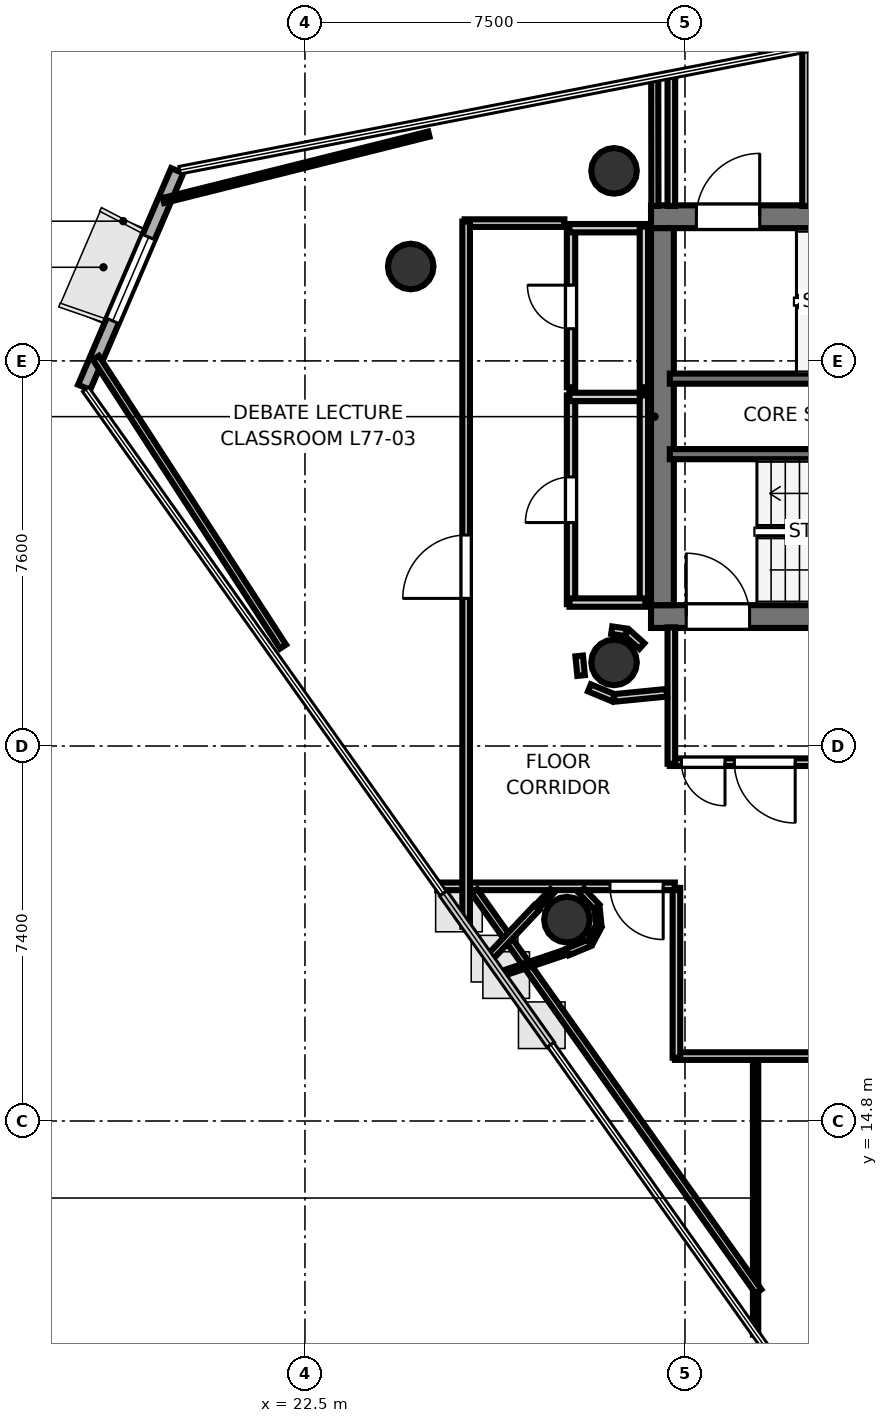
"""IFC4 building model, lengths in metres.
Left out: names, types, materials, properties, quantities, classifications, styles, units other than length and angle.
Written with IfcOpenShell. Run it as: python <this file> out.ifc"""

import sys

from ifc_helpers import new_model, si_unit, direction, frame, frame_2d, origin, origin_2d, place, context, subcontext, project, spatial, rectangle, hollow_circle, extrude, element, fill, save


model = new_model("IFC4")
c1 = context("Model", 3, precision=1e-05, world=origin(), true_north=direction((0.0, 1.0)))
c2 = subcontext(c1, "Body", "Model", "MODEL_VIEW")
j1 = project(units=[si_unit("LENGTHUNIT", "METRE"), si_unit("PLANEANGLEUNIT", "RADIAN")], contexts=[c1])
p1 = place(None, origin())
s1 = spatial("IfcSite", under=j1, at=p1, CompositionType="ELEMENT")
p2 = place(p1, origin())
s2 = spatial("IfcBuilding", under=s1, at=p2, CompositionType="ELEMENT")
p3 = place(p2, frame((0.0, 0.0, 299.1)))
s3 = spatial("IfcBuildingStorey", under=s2, at=p3, CompositionType="ELEMENT", Elevation=299.1)
p4 = place(p3, frame((29.33, 32.645, 0.0), z_axis=(0.0, 0.0, 1.0), x_axis=(1.0, 0.0, 0.0)))
e1 = element("IfcWall", 1, at=p4, inside=s3, PredefinedType="SHEAR", context=c2, shape_type="SweptSolid", body=[
    extrude(rectangle(XDim=10.52, YDim=0.45, at=frame_2d((5.26, 0.0))), origin(), (0.0, 0.0, 1.0), 3.52),
])
p5 = place(p4, frame((0.895, 0.0, 0.0)))
e2 = element("IfcOpeningElement", 2, at=p5, cuts=e1, PredefinedType="OPENING", context=c2, shape_type="SweptSolid", body=[
    extrude(rectangle(XDim=1.25, YDim=2.15, at=frame_2d((0.625, 1.075))), frame((0.0, 0.235, 0.0), z_axis=(0.0, -1.0, 0.0), x_axis=(1.0, 0.0, 0.0)), (0.0, 0.0, 1.0), 0.47),
])
p6 = place(p3, frame((29.33, 24.755, 0.0), z_axis=(0.0, 0.0, 1.0), x_axis=(1.0, 0.0, 0.0)))
e3 = element("IfcWall", 3, at=p6, inside=s3, PredefinedType="SHEAR", context=c2, shape_type="SweptSolid", body=[
    extrude(rectangle(XDim=10.52, YDim=0.45, at=frame_2d((5.26, 0.0))), origin(), (0.0, 0.0, 1.0), 3.52),
])
p7 = place(p6, frame((0.695, 0.0, 0.0)))
e4 = element("IfcOpeningElement", 4, at=p7, cuts=e3, PredefinedType="OPENING", context=c2, shape_type="SweptSolid", body=[
    extrude(rectangle(XDim=1.25, YDim=2.15, at=frame_2d((0.625, 1.075))), frame((0.0, 0.235, 0.0), z_axis=(0.0, -1.0, 0.0), x_axis=(1.0, 0.0, 0.0)), (0.0, 0.0, 1.0), 0.47),
])
p8 = place(p3, frame((29.555, 24.98, 0.0), z_axis=(0.0, 0.0, 1.0), x_axis=(0.0, 1.0, 0.0)))
e5 = element("IfcWall", 5, at=p8, inside=s3, PredefinedType="SHEAR", context=c2, shape_type="SweptSolid", body=[
    extrude(rectangle(XDim=7.44, YDim=0.45, at=frame_2d((3.72, 0.0))), origin(), (0.0, 0.0, 1.0), 3.52),
])
for number, where, z_axis, x_axis in (
    (6, (28.6, 33.55, 0.0), (0.0, 0.0, 1.0), (1.0, 0.0, 0.0)),
    (7, (28.6, 23.85, 0.0), (0.0, 0.0, 1.0), (1.0, 0.0, 0.0)),
    (8, (24.587, 31.663, 0.0), (0.0, 0.0, 1.0), (1.0, 0.0, 0.0)),
    (9, (27.67, 18.774, 0.0), (0.0, 0.0, 1.0), (1.0, 0.0, 0.0)),
):
    element("IfcColumn", number, at=place(p3, frame(where, z_axis=z_axis, x_axis=x_axis)), inside=s3, PredefinedType="COLUMN", context=c2, shape_type="SweptSolid", body=[
        extrude(hollow_circle(Radius=0.45, WallThickness=0.025, at=origin_2d()), origin(), (0.0, 0.0, 1.0), 3.7),
    ])
p9 = place(p3, frame((19.979, 33.554, 0.0), z_axis=(0.0, 0.0, 1.0), x_axis=(-0.394793036807, -0.918770079013, 0.0)))
e10 = element("IfcWall", 10, at=p9, inside=s3, PredefinedType="SOLIDWALL", context=c2, shape_type="SweptSolid", body=[
    extrude(rectangle(XDim=4.653, YDim=0.26, at=frame_2d((2.326, 0.0))), origin(), (0.0, 0.0, 1.0), 3.52),
])
p10 = place(p9, frame((1.426, 0.0, 0.85)))
e11 = element("IfcOpeningElement", 11, at=p10, cuts=e10, PredefinedType="OPENING", context=c2, shape_type="SweptSolid", body=[
    extrude(rectangle(XDim=1.8, YDim=2.1, at=frame_2d((0.9, 1.05))), frame((0.0, 0.14, 0.0), z_axis=(0.0, -1.0, 0.0), x_axis=(1.0, 0.0, 0.0)), (0.0, 0.0, 1.0), 0.28),
])
p11 = place(p3, frame((29.7, 29.45, 0.0), z_axis=(0.0, 0.0, 1.0), x_axis=(1.0, 0.0, 0.0)))
e12 = element("IfcWall", 12, at=p11, inside=s3, PredefinedType="SOLIDWALL", context=c2, shape_type="SweptSolid", body=[
    extrude(rectangle(XDim=8.3, YDim=0.2, at=frame_2d((4.15, 0.0))), origin(), (0.0, 0.0, 1.0), 3.52),
])
p12 = place(p3, frame((29.7, 27.96, 0.0), z_axis=(0.0, 0.0, 1.0), x_axis=(1.0, 0.0, 0.0)))
e13 = element("IfcWall", 13, at=p12, inside=s3, PredefinedType="SOLIDWALL", context=c2, shape_type="SweptSolid", body=[
    extrude(rectangle(XDim=7.75, YDim=0.2, at=frame_2d((3.875, 0.0))), origin(), (0.0, 0.0, 1.0), 3.52),
])
p13 = place(p3, frame((29.731, 32.858, 0.0), z_axis=(0.0, 0.0, 1.0), x_axis=(0.0, 1.0, 0.0)))
e14 = element("IfcWall", 14, at=p13, inside=s3, PredefinedType="PARTITIONING", context=c2, shape_type="SweptSolid", body=[
    extrude(rectangle(XDim=2.613, YDim=0.15, at=frame_2d((1.307, 0.0))), origin(), (0.0, 0.0, 1.0), 2.84),
])
p14 = place(p3, frame((32.389, 35.988, 0.0), z_axis=(0.0, 0.0, 1.0), x_axis=(0.0, -1.0, 0.0)))
e15 = element("IfcWall", 15, at=p14, inside=s3, PredefinedType="PARTITIONING", context=c2, shape_type="SweptSolid", body=[
    extrude(rectangle(XDim=3.13, YDim=0.15, at=frame_2d((1.565, 0.0))), origin(), (0.0, 0.0, 1.0), 2.84),
])
p15 = place(p3, frame((33.45, 21.881, 0.0), z_axis=(0.0, 0.0, 1.0), x_axis=(-1.0, 0.0, 0.0)))
e16 = element("IfcWall", 16, at=p15, inside=s3, PredefinedType="PARTITIONING", context=c2, shape_type="SweptSolid", body=[
    extrude(rectangle(XDim=3.75, YDim=0.15, at=frame_2d((1.875, 0.0))), origin(), (0.0, 0.0, 1.0), 2.84),
])
p16 = place(p15, frame((1.275, 0.0, 0.0)))
e17 = element("IfcOpeningElement", 17, at=p16, cuts=e16, PredefinedType="OPENING", context=c2, shape_type="SweptSolid", body=[
    extrude(rectangle(XDim=1.2, YDim=2.15, at=frame_2d((0.6, 1.075))), frame((0.0, 0.085, 0.0), z_axis=(0.0, -1.0, 0.0), x_axis=(1.0, 0.0, 0.0)), (0.0, 0.0, 1.0), 0.17),
])
p17 = place(p15, frame((2.66, 0.0, 0.0)))
e18 = element("IfcOpeningElement", 18, at=p17, cuts=e16, PredefinedType="OPENING", context=c2, shape_type="SweptSolid", body=[
    extrude(rectangle(XDim=0.86, YDim=2.05, at=frame_2d((0.43, 1.025))), frame((0.0, 0.085, 0.0), z_axis=(0.0, -1.0, 0.0), x_axis=(1.0, 0.0, 0.0)), (0.0, 0.0, 1.0), 0.17),
])
p18 = place(p3, frame((29.731, 21.85, 0.0), z_axis=(0.0, 0.0, 1.0), x_axis=(0.0, 1.0, 0.0)))
e19 = element("IfcWall", 19, at=p18, inside=s3, PredefinedType="PARTITIONING", context=c2, shape_type="SweptSolid", body=[
    extrude(rectangle(XDim=2.692, YDim=0.15, at=frame_2d((1.346, 0.0))), origin(), (0.0, 0.0, 1.0), 2.84),
])
p19 = place(p3, frame((27.751, 25.0, 0.0), z_axis=(0.0, 0.0, 1.0), x_axis=(0.0, 1.0, 0.0)))
e20 = element("IfcWall", 20, at=p19, inside=s3, PredefinedType="PLUMBINGWALL", context=c2, shape_type="SweptSolid", body=[
    extrude(rectangle(XDim=4.12, YDim=0.165, at=frame_2d((2.06, 0.0))), origin(), (0.0, 0.0, 1.0), 2.84),
])
p20 = place(p19, frame((1.61, 0.0, 0.0)))
e21 = element("IfcOpeningElement", 21, at=p20, cuts=e20, PredefinedType="OPENING", context=c2, shape_type="SweptSolid", body=[
    extrude(rectangle(XDim=0.9, YDim=2.1, at=frame_2d((0.45, 1.05))), frame((0.0, 0.093, 0.0), z_axis=(0.0, -1.0, 0.0), x_axis=(1.0, 0.0, 0.0)), (0.0, 0.0, 1.0), 0.185),
])
p21 = place(p3, frame((27.72, 29.089, 0.0), z_axis=(0.0, 0.0, 1.0), x_axis=(1.0, 0.0, 0.0)))
e22 = element("IfcWall", 22, at=p21, inside=s3, PredefinedType="PLUMBINGWALL", context=c2, shape_type="SweptSolid", body=[
    extrude(rectangle(XDim=1.5, YDim=0.165, at=frame_2d((0.75, 0.0))), origin(), (0.0, 0.0, 1.0), 2.84),
])
p22 = place(p3, frame((29.189, 29.12, 0.0), z_axis=(0.0, 0.0, 1.0), x_axis=(0.0, -1.0, 0.0)))
e23 = element("IfcWall", 23, at=p22, inside=s3, PredefinedType="PLUMBINGWALL", context=c2, shape_type="SweptSolid", body=[
    extrude(rectangle(XDim=4.12, YDim=0.165, at=frame_2d((2.06, 0.0))), origin(), (0.0, 0.0, 1.0), 2.84),
])
p23 = place(p3, frame((29.22, 25.031, 0.0), z_axis=(0.0, 0.0, 1.0), x_axis=(-1.0, 0.0, 0.0)))
e24 = element("IfcWall", 24, at=p23, inside=s3, PredefinedType="PLUMBINGWALL", context=c2, shape_type="SweptSolid", body=[
    extrude(rectangle(XDim=1.5, YDim=0.165, at=frame_2d((0.75, 0.0))), origin(), (0.0, 0.0, 1.0), 2.84),
])
p24 = place(p3, frame((27.751, 29.28, 0.0), z_axis=(0.0, 0.0, 1.0), x_axis=(0.0, 1.0, 0.0)))
e25 = element("IfcWall", 25, at=p24, inside=s3, PredefinedType="PLUMBINGWALL", context=c2, shape_type="SweptSolid", body=[
    extrude(rectangle(XDim=3.17, YDim=0.165, at=frame_2d((1.585, 0.0))), origin(), (0.0, 0.0, 1.0), 2.84),
])
p25 = place(p24, frame((1.155, 0.0, 0.0)))
e26 = element("IfcOpeningElement", 26, at=p25, cuts=e25, PredefinedType="OPENING", context=c2, shape_type="SweptSolid", body=[
    extrude(rectangle(XDim=0.86, YDim=2.05, at=frame_2d((0.43, 1.025))), frame((0.0, 0.093, 0.0), z_axis=(0.0, -1.0, 0.0), x_axis=(1.0, 0.0, 0.0)), (0.0, 0.0, 1.0), 0.185),
])
p26 = place(p3, frame((27.72, 32.419, 0.0), z_axis=(0.0, 0.0, 1.0), x_axis=(1.0, 0.0, 0.0)))
e27 = element("IfcWall", 27, at=p26, inside=s3, PredefinedType="PLUMBINGWALL", context=c2, shape_type="SweptSolid", body=[
    extrude(rectangle(XDim=1.5, YDim=0.165, at=frame_2d((0.75, 0.0))), origin(), (0.0, 0.0, 1.0), 2.84),
])
p27 = place(p3, frame((29.189, 32.45, 0.0), z_axis=(0.0, 0.0, 1.0), x_axis=(0.0, -1.0, 0.0)))
e28 = element("IfcWall", 28, at=p27, inside=s3, PredefinedType="PLUMBINGWALL", context=c2, shape_type="SweptSolid", body=[
    extrude(rectangle(XDim=3.17, YDim=0.165, at=frame_2d((1.585, 0.0))), origin(), (0.0, 0.0, 1.0), 2.84),
])
p28 = place(p3, frame((29.149, 24.173, 0.0), z_axis=(0.0, 0.0, 1.0), x_axis=(-0.745225165416, 0.666812906917, 0.0)))
e29 = element("IfcWall", 29, at=p28, inside=s3, PredefinedType="PARTITIONING", context=c2, shape_type="SweptSolid", body=[
    extrude(rectangle(XDim=0.396, YDim=0.15, at=frame_2d((0.198, 0.0))), origin(), (0.0, 0.0, 1.0), 2.84),
])
p29 = place(p3, frame((28.838, 24.444, 0.0), z_axis=(0.0, 0.0, 1.0), x_axis=(-0.989449148305, 0.144880581578, 0.0)))
e30 = element("IfcWall", 30, at=p29, inside=s3, PredefinedType="PARTITIONING", context=c2, shape_type="SweptSolid", body=[
    extrude(rectangle(XDim=0.286, YDim=0.15, at=frame_2d((0.143, 0.0))), origin(), (0.0, 0.0, 1.0), 2.84),
])
p30 = place(p3, frame((25.65, 32.519, 0.0), z_axis=(0.0, 0.0, 1.0), x_axis=(1.0, 0.0, 0.0)))
e31 = element("IfcWall", 31, at=p30, inside=s3, PredefinedType="PARTITIONING", context=c2, shape_type="SweptSolid", body=[
    extrude(rectangle(XDim=1.97, YDim=0.15, at=frame_2d((0.985, 0.0))), origin(), (0.0, 0.0, 1.0), 2.84),
])
p31 = place(p3, frame((27.912, 23.978, 0.0), z_axis=(0.0, 0.0, 1.0), x_axis=(0.097888269922, -0.995197410875, 0.0)))
e32 = element("IfcWall", 32, at=p31, inside=s3, PredefinedType="PARTITIONING", context=c2, shape_type="SweptSolid", body=[
    extrude(rectangle(XDim=0.389, YDim=0.15, at=frame_2d((0.195, 0.0))), origin(), (0.0, 0.0, 1.0), 2.84),
])
p32 = place(p3, frame((28.115, 23.348, 0.0), z_axis=(0.0, 0.0, 1.0), x_axis=(0.923807847969, -0.382856448334, 0.0)))
e33 = element("IfcWall", 33, at=p32, inside=s3, PredefinedType="PARTITIONING", context=c2, shape_type="SweptSolid", body=[
    extrude(rectangle(XDim=0.513, YDim=0.15, at=frame_2d((0.256, 0.0))), origin(), (0.0, 0.0, 1.0), 2.84),
])
p33 = place(p3, frame((28.603, 23.149, 0.0), z_axis=(0.0, 0.0, 1.0), x_axis=(0.995179827095, 0.098066873836, 0.0)))
e34 = element("IfcWall", 34, at=p33, inside=s3, PredefinedType="PARTITIONING", context=c2, shape_type="SweptSolid", body=[
    extrude(rectangle(XDim=1.043, YDim=0.15, at=frame_2d((0.521, 0.0))), origin(), (0.0, 0.0, 1.0), 2.84),
])
p34 = place(p3, frame((42.65, 16.081, 0.0), z_axis=(0.0, 0.0, 1.0), x_axis=(-1.0, 0.0, 0.0)))
e35 = element("IfcWall", 35, at=p34, inside=s3, PredefinedType="PARTITIONING", context=c2, shape_type="SweptSolid", body=[
    extrude(rectangle(XDim=12.85, YDim=0.15, at=frame_2d((6.425, 0.0))), origin(), (0.0, 0.0, 1.0), 2.84),
])
p35 = place(p34, frame((7.357, 0.0, 0.0)))
e36 = element("IfcOpeningElement", 36, at=p35, cuts=e35, PredefinedType="OPENING", context=c2, shape_type="SweptSolid", body=[
    extrude(rectangle(XDim=0.98, YDim=2.1, at=frame_2d((0.49, 1.05))), frame((0.0, 0.085, 0.0), z_axis=(0.0, -1.0, 0.0), x_axis=(1.0, 0.0, 0.0)), (0.0, 0.0, 1.0), 0.17),
])
p36 = place(p3, frame((29.831, 16.05, 0.0), z_axis=(0.0, 0.0, 1.0), x_axis=(0.0, 1.0, 0.0)))
e37 = element("IfcWall", 37, at=p36, inside=s3, PredefinedType="PARTITIONING", context=c2, shape_type="SweptSolid", body=[
    extrude(rectangle(XDim=3.35, YDim=0.15, at=frame_2d((1.675, 0.0))), origin(), (0.0, 0.0, 1.0), 2.84),
])
p37 = place(p3, frame((29.8, 19.431, 0.0), z_axis=(0.0, 0.0, 1.0), x_axis=(-1.0, 0.0, 0.0)))
e38 = element("IfcWall", 38, at=p37, inside=s3, PredefinedType="PARTITIONING", context=c2, shape_type="SweptSolid", body=[
    extrude(rectangle(XDim=4.689, YDim=0.15, at=frame_2d((2.345, 0.0))), origin(), (0.0, 0.0, 1.0), 2.84),
])
p38 = place(p37, frame((0.23, 0.0, 0.0)))
e39 = element("IfcOpeningElement", 39, at=p38, cuts=e38, PredefinedType="OPENING", context=c2, shape_type="SweptSolid", body=[
    extrude(rectangle(XDim=1.05, YDim=2.15, at=frame_2d((0.525, 1.075))), frame((0.0, 0.085, 0.0), z_axis=(0.0, -1.0, 0.0), x_axis=(1.0, 0.0, 0.0)), (0.0, 0.0, 1.0), 0.17),
])
p39 = place(p3, frame((25.681, 18.635, 0.0), z_axis=(0.0, 0.0, 1.0), x_axis=(0.0, 1.0, 0.0)))
e40 = element("IfcWall", 40, at=p39, inside=s3, PredefinedType="PARTITIONING", context=c2, shape_type="SweptSolid", body=[
    extrude(rectangle(XDim=13.915, YDim=0.15, at=frame_2d((6.958, 0.0))), origin(), (0.0, 0.0, 1.0), 2.84),
])
p40 = place(p39, frame((6.478, 0.0, 0.0)))
e41 = element("IfcOpeningElement", 41, at=p40, cuts=e40, PredefinedType="OPENING", context=c2, shape_type="SweptSolid", body=[
    extrude(rectangle(XDim=1.25, YDim=2.2, at=frame_2d((0.625, 1.1))), frame((0.0, 0.085, 0.0), z_axis=(0.0, -1.0, 0.0), x_axis=(1.0, 0.0, 0.0)), (0.0, 0.0, 1.0), 0.17),
])
p41 = place(p3, frame((31.394, 15.975, 0.0), z_axis=(0.0, 0.0, 1.0), x_axis=(0.0, -1.0, 0.0)))
e42 = element("IfcWall", 42, at=p41, inside=s3, PredefinedType="PARTITIONING", context=c2, shape_type="SweptSolid", body=[
    extrude(rectangle(XDim=5.39, YDim=0.105, at=frame_2d((2.695, 0.0))), origin(), (0.0, 0.0, 1.0), 2.84),
])
p42 = place(p3, frame((31.45, 11.435, 0.0), z_axis=(0.0, 0.0, 1.0), x_axis=(-0.578718901732, 0.815527088929, 0.0)))
e43 = element("IfcWall", 43, at=p42, inside=s3, PredefinedType="PARTITIONING", context=c2, shape_type="SweptSolid", body=[
    extrude(rectangle(XDim=9.691, YDim=0.14, at=frame_2d((4.846, 0.0))), origin(), (0.0, 0.0, 1.0), 2.84),
])
p43 = place(p3, frame((27.381, 19.341, 0.0), z_axis=(0.0, 0.0, 1.0), x_axis=(-0.689047004353, -0.724716652073, 0.0)))
e44 = element("IfcWall", 44, at=p43, inside=s3, PredefinedType="PARTITIONING", context=c2, shape_type="SweptSolid", body=[
    extrude(rectangle(XDim=0.431, YDim=0.105, at=frame_2d((0.216, 0.0))), origin(), (0.0, 0.0, 1.0), 2.84),
])
p44 = place(p3, frame((27.076, 19.01, 0.0), z_axis=(0.0, 0.0, 1.0), x_axis=(-0.686853877434, -0.726795535934, 0.0)))
e45 = element("IfcWall", 45, at=p44, inside=s3, PredefinedType="PARTITIONING", context=c2, shape_type="SweptSolid", body=[
    extrude(rectangle(XDim=1.369, YDim=0.14, at=frame_2d((0.685, 0.0))), origin(), (0.0, 0.0, 1.0), 2.84),
])
p45 = place(p3, frame((26.36, 17.699, 0.0), z_axis=(0.0, 0.0, 1.0), x_axis=(0.947806372533, 0.318846483727, 0.0)))
e46 = element("IfcWall", 46, at=p45, inside=s3, PredefinedType="PARTITIONING", context=c2, shape_type="SweptSolid", body=[
    extrude(rectangle(XDim=1.37, YDim=0.105, at=frame_2d((0.685, 0.0))), origin(), (0.0, 0.0, 1.0), 2.84),
])
p46 = place(p3, frame((27.682, 18.135, 0.0), z_axis=(0.0, 0.0, 1.0), x_axis=(0.924048683901, 0.382274809242, 0.0)))
e47 = element("IfcWall", 47, at=p46, inside=s3, PredefinedType="PARTITIONING", context=c2, shape_type="SweptSolid", body=[
    extrude(rectangle(XDim=0.467, YDim=0.14, at=frame_2d((0.233, 0.0))), origin(), (0.0, 0.0, 1.0), 2.84),
])
p47 = place(p3, frame((28.129, 18.328, 0.0), z_axis=(0.0, 0.0, 1.0), x_axis=(0.471589913721, 0.881817981942, 0.0)))
e48 = element("IfcWall", 48, at=p47, inside=s3, PredefinedType="PARTITIONING", context=c2, shape_type="SweptSolid", body=[
    extrude(rectangle(XDim=0.354, YDim=0.12, at=frame_2d((0.177, 0.0))), origin(), (0.0, 0.0, 1.0), 2.84),
])
p48 = place(p3, frame((28.299, 18.658, 0.0), z_axis=(0.0, 0.0, 1.0), x_axis=(-0.097865889817, 0.995199611942, 0.0)))
e49 = element("IfcWall", 49, at=p48, inside=s3, PredefinedType="PARTITIONING", context=c2, shape_type="SweptSolid", body=[
    extrude(rectangle(XDim=0.354, YDim=0.105, at=frame_2d((0.177, 0.0))), origin(), (0.0, 0.0, 1.0), 2.84),
])
p49 = place(p3, frame((28.256, 19.029, 0.0), z_axis=(0.0, 0.0, 1.0), x_axis=(-0.689344198757, 0.724433969137, 0.0)))
e50 = element("IfcWall", 50, at=p49, inside=s3, PredefinedType="PARTITIONING", context=c2, shape_type="SweptSolid", body=[
    extrude(rectangle(XDim=0.431, YDim=0.14, at=frame_2d((0.216, 0.0))), origin(), (0.0, 0.0, 1.0), 2.84),
])
p50 = place(p3, frame((19.708, 32.966, 0.0), z_axis=(0.0, 0.0, 1.0), x_axis=(0.970113232827, 0.242652664306, 0.0)))
e51 = element("IfcWall", 51, at=p50, inside=s3, PredefinedType="PARTITIONING", context=c2, shape_type="SweptSolid", body=[
    extrude(rectangle(XDim=5.399, YDim=0.105, at=frame_2d((2.699, 0.0))), origin(), (0.0, 0.0, 1.0), 2.84),
])
p51 = place(p3, frame((29.403, 35.407, 0.0), z_axis=(0.0, 0.0, 1.0), x_axis=(0.001532418467, -0.999998825846, 0.0)))
e52 = element("IfcWall", 52, at=p51, inside=s3, PredefinedType="PARTITIONING", context=c2, shape_type="SweptSolid", body=[
    extrude(rectangle(XDim=2.549, YDim=0.14, at=frame_2d((1.274, 0.0))), origin(), (0.0, 0.0, 1.0), 2.84),
])
p52 = place(p3, frame((22.068, 24.162, 0.0), z_axis=(0.0, 0.0, 1.0), x_axis=(-0.543845770902, 0.839185186638, 0.0)))
e53 = element("IfcWall", 53, at=p52, inside=s3, PredefinedType="PARTITIONING", context=c2, shape_type="SweptSolid", body=[
    extrude(rectangle(XDim=6.792, YDim=0.14, at=frame_2d((3.396, 0.0))), origin(), (0.0, 0.0, 1.0), 2.84),
])
p53 = place(p5, origin())
e54 = element("IfcDoor", 54, at=p53, inside=s3, OperationType="SINGLE_SWING_RIGHT", PredefinedType="DOOR", context=c2, shape_type="SweptSolid", body=[
    extrude(rectangle(XDim=1.25, YDim=2.15, at=frame_2d((0.625, 1.075))), frame((0.0, 0.025, 0.0), z_axis=(0.0, -1.0, 0.0), x_axis=(1.0, 0.0, 0.0)), (0.0, 0.0, 1.0), 0.05),
])
fill(e2, e54)
p54 = place(p7, origin())
e55 = element("IfcDoor", 55, at=p54, inside=s3, OperationType="SINGLE_SWING_LEFT", PredefinedType="DOOR", context=c2, shape_type="SweptSolid", body=[
    extrude(rectangle(XDim=1.25, YDim=2.15, at=frame_2d((0.625, 1.075))), frame((0.0, 0.025, 0.0), z_axis=(0.0, -1.0, 0.0), x_axis=(1.0, 0.0, 0.0)), (0.0, 0.0, 1.0), 0.05),
])
fill(e4, e55)
p55 = place(p16, origin())
e56 = element("IfcDoor", 56, at=p55, inside=s3, OperationType="SINGLE_SWING_LEFT", PredefinedType="DOOR", context=c2, shape_type="SweptSolid", body=[
    extrude(rectangle(XDim=1.2, YDim=2.15, at=frame_2d((0.6, 1.075))), frame((0.0, 0.025, 0.0), z_axis=(0.0, -1.0, 0.0), x_axis=(1.0, 0.0, 0.0)), (0.0, 0.0, 1.0), 0.05),
])
fill(e17, e56)
p56 = place(p20, origin())
e57 = element("IfcDoor", 57, at=p56, inside=s3, OperationType="SINGLE_SWING_LEFT", PredefinedType="DOOR", context=c2, shape_type="SweptSolid", body=[
    extrude(rectangle(XDim=0.9, YDim=2.1, at=frame_2d((0.45, 1.05))), frame((0.0, 0.025, 0.0), z_axis=(0.0, -1.0, 0.0), x_axis=(1.0, 0.0, 0.0)), (0.0, 0.0, 1.0), 0.05),
])
fill(e21, e57)
p57 = place(p25, origin())
e58 = element("IfcDoor", 58, at=p57, inside=s3, OperationType="SINGLE_SWING_RIGHT", PredefinedType="DOOR", context=c2, shape_type="SweptSolid", body=[
    extrude(rectangle(XDim=0.86, YDim=2.05, at=frame_2d((0.43, 1.025))), frame((0.0, 0.025, 0.0), z_axis=(0.0, -1.0, 0.0), x_axis=(1.0, 0.0, 0.0)), (0.0, 0.0, 1.0), 0.05),
])
fill(e26, e58)
p58 = place(p17, origin())
e59 = element("IfcDoor", 59, at=p58, inside=s3, OperationType="SINGLE_SWING_LEFT", PredefinedType="DOOR", context=c2, shape_type="SweptSolid", body=[
    extrude(rectangle(XDim=0.86, YDim=2.05, at=frame_2d((0.43, 1.025))), frame((0.0, 0.025, 0.0), z_axis=(0.0, -1.0, 0.0), x_axis=(1.0, 0.0, 0.0)), (0.0, 0.0, 1.0), 0.05),
])
fill(e18, e59)
p59 = place(p38, origin())
e60 = element("IfcDoor", 60, at=p59, inside=s3, OperationType="SINGLE_SWING_LEFT", PredefinedType="DOOR", context=c2, shape_type="SweptSolid", body=[
    extrude(rectangle(XDim=1.05, YDim=2.15, at=frame_2d((0.525, 1.075))), frame((0.0, 0.025, 0.0), z_axis=(0.0, -1.0, 0.0), x_axis=(1.0, 0.0, 0.0)), (0.0, 0.0, 1.0), 0.05),
])
fill(e39, e60)
p60 = place(p40, origin())
e61 = element("IfcDoor", 61, at=p60, inside=s3, OperationType="SINGLE_SWING_LEFT", PredefinedType="DOOR", context=c2, shape_type="SweptSolid", body=[
    extrude(rectangle(XDim=1.25, YDim=2.2, at=frame_2d((0.625, 1.1))), frame((0.0, 0.025, 0.0), z_axis=(0.0, -1.0, 0.0), x_axis=(1.0, 0.0, 0.0)), (0.0, 0.0, 1.0), 0.05),
])
fill(e41, e61)
p61 = place(p10, origin())
e62 = element("IfcWindow", 62, at=p61, inside=s3, PartitioningType="SINGLE_PANEL", PredefinedType="WINDOW", context=c2, shape_type="SweptSolid", body=[
    extrude(rectangle(XDim=1.8, YDim=2.1, at=frame_2d((0.9, 1.05))), frame((0.0, 0.03, 0.0), z_axis=(0.0, -1.0, 0.0), x_axis=(1.0, 0.0, 0.0)), (0.0, 0.0, 1.0), 0.06),
])
fill(e11, e62)
save(model, sys.argv[1])
